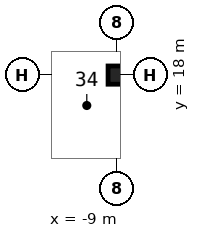
"""IFC4 building model, lengths in metres.
Left out: names, types, materials, properties, quantities, classifications, styles, units other than length and angle.
Written with IfcOpenShell. Run it as: python <this file> out.ifc"""

import sys

from ifc_helpers import new_model, si_unit, direction, frame, origin, origin_2d, place, context, subcontext, project, spatial, rectangle, extrude, element, save


model = new_model("IFC4")
c1 = context("Model", 3, precision=1e-05, world=origin(), true_north=direction((0.0, 1.0)))
c2 = subcontext(c1, "Body", "Model", "MODEL_VIEW")
j1 = project(units=[si_unit("LENGTHUNIT", "METRE"), si_unit("PLANEANGLEUNIT", "RADIAN")], contexts=[c1])
p1 = place(None, origin())
s1 = spatial("IfcSite", under=j1, at=p1, CompositionType="ELEMENT")
p2 = place(p1, origin())
s2 = spatial("IfcBuilding", under=s1, at=p2, CompositionType="ELEMENT")
p3 = place(p2, frame((0.0, 0.0, -4.5)))
s3 = spatial("IfcBuildingStorey", under=s2, at=p3, CompositionType="ELEMENT", Elevation=-4.5)
p4 = place(p3, frame((-9.0, 18.0, 0.0), z_axis=(0.0, 0.0, 1.0), x_axis=(1.0, 0.0, 0.0)))
e1 = element("IfcColumn", 1, at=p4, inside=s3, PredefinedType="COLUMN", context=c2, shape_type="SweptSolid", body=[
    extrude(rectangle(XDim=1.2, YDim=1.2, at=origin_2d()), origin(), (0.0, 0.0, 1.0), 4.5),
])
save(model, sys.argv[1])
